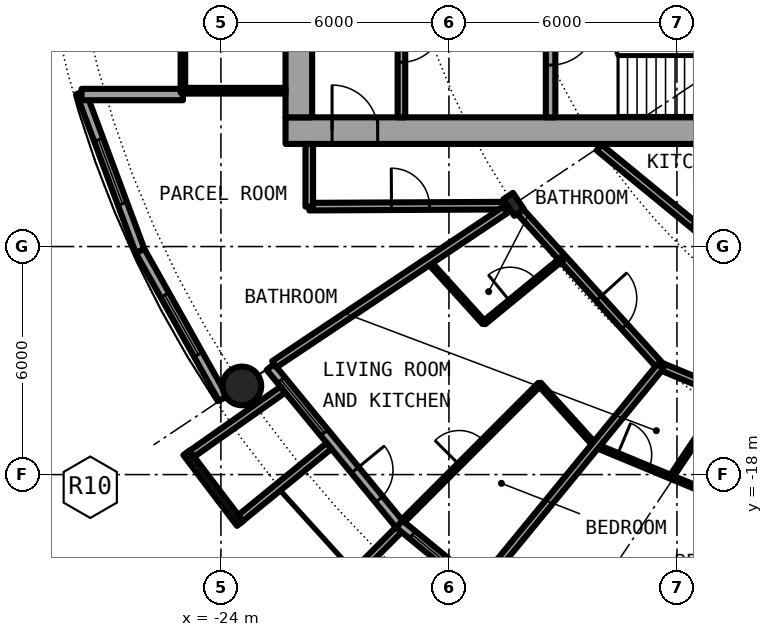
"""IFC4 building model, lengths in metres.
Left out: names, types, materials, properties, quantities, classifications, styles, units other than length and angle.
Written with IfcOpenShell. Run it as: python <this file> out.ifc"""

import sys

from ifc_helpers import new_model, si_unit, direction, frame, frame_2d, origin, origin_2d, place, context, subcontext, project, spatial, rectangle, circle, hollow_circle, i_section, extrude, element, fill, save


model = new_model("IFC4")
c1 = context("Model", 3, precision=1e-05, world=origin(), true_north=direction((0.0, 1.0)))
c2 = subcontext(c1, "Body", "Model", "MODEL_VIEW")
j1 = project(units=[si_unit("LENGTHUNIT", "METRE"), si_unit("PLANEANGLEUNIT", "RADIAN")], contexts=[c1])
p1 = place(None, origin())
s1 = spatial("IfcSite", under=j1, at=p1, CompositionType="ELEMENT")
p2 = place(p1, origin())
s2 = spatial("IfcBuilding", under=s1, at=p2, CompositionType="ELEMENT")
p3 = place(p2, frame((0.0, 0.0, 75.8)))
s3 = spatial("IfcBuildingStorey", under=s2, at=p3, CompositionType="ELEMENT", Elevation=75.8)
p4 = place(p3, frame((-23.448, -15.667, 0.0), z_axis=(0.0, 0.0, 1.0), x_axis=(1.0, 0.0, 0.0)))
e1 = element("IfcColumn", 1, at=p4, inside=s3, PredefinedType="COLUMN", context=c2, shape_type="SweptSolid", body=[
    extrude(hollow_circle(Radius=0.508, WallThickness=0.04, at=origin_2d()), origin(), (0.0, 0.0, 1.0), 3.05),
])
p5 = place(p3, frame((-16.297, -10.889, 0.0), z_axis=(0.0, 0.0, 1.0), x_axis=(-0.831469612303, -0.55557023302, 0.0)))
e2 = element("IfcColumn", 2, at=p5, inside=s3, PredefinedType="COLUMN", context=c2, shape_type="SweptSolid", body=[
    extrude(i_section(OverallWidth=0.306, OverallDepth=0.524, WebThickness=0.021, FlangeThickness=0.04, FilletRadius=0.027, at=origin_2d()), origin(), (0.0, 0.0, 1.0), 3.05),
])
p6 = place(p3, frame((-22.699, -15.167, 0.0), z_axis=(0.0, 0.0, 1.0), x_axis=(0.634382322723, -0.773019449054, 0.0)))
e3 = element("IfcWall", 3, at=p6, inside=s3, PredefinedType="SOLIDWALL", context=c2, shape_type="SweptSolid", body=[
    extrude(rectangle(XDim=5.352, YDim=0.25, at=frame_2d((2.676, 0.0))), origin(), (0.0, 0.0, 1.0), 2.7),
])
p7 = place(p6, frame((0.441, 0.0, 0.3)))
e4 = element("IfcOpeningElement", 4, at=p7, cuts=e3, PredefinedType="OPENING", context=c2, shape_type="SweptSolid", body=[
    extrude(rectangle(XDim=1.8, YDim=2.1, at=frame_2d((0.9, 1.05))), frame((0.0, 0.135, 0.0), z_axis=(0.0, -1.0, 0.0), x_axis=(1.0, 0.0, 0.0)), (0.0, 0.0, 1.0), 0.27),
])
p8 = place(p6, frame((3.51, 0.0, 0.0)))
e5 = element("IfcOpeningElement", 5, at=p8, cuts=e3, PredefinedType="OPENING", context=c2, shape_type="SweptSolid", body=[
    extrude(rectangle(XDim=1.0, YDim=2.2, at=frame_2d((0.5, 1.1))), frame((0.0, 0.135, 0.0), z_axis=(0.0, -1.0, 0.0), x_axis=(1.0, 0.0, 0.0)), (0.0, 0.0, 1.0), 0.27),
])
p9 = place(p3, frame((-24.909, -17.427, -0.03), z_axis=(0.0, 0.0, 1.0), x_axis=(0.60418752353, -0.796842165306, 0.0)))
e6 = element("IfcWall", 6, at=p9, inside=s3, PredefinedType="SOLIDWALL", context=c2, shape_type="SweptSolid", body=[
    extrude(rectangle(XDim=2.337, YDim=0.2, at=frame_2d((1.168, 0.0))), origin(), (0.0, 0.0, 1.0), 2.73),
])
p10 = place(p9, frame((0.128, 0.0, 0.33)))
e7 = element("IfcOpeningElement", 7, at=p10, cuts=e6, PredefinedType="OPENING", context=c2, shape_type="SweptSolid", body=[
    extrude(circle(Radius=1.04, at=frame_2d((1.04, 1.04))), frame((0.0, 0.11, 0.0), z_axis=(0.0, -1.0, 0.0), x_axis=(1.0, 0.0, 0.0)), (0.0, 0.0, 1.0), 0.22),
])
p11 = place(p3, frame((-22.37, -15.765, -0.03), z_axis=(0.0, 0.0, 1.0), x_axis=(-0.817256123454, -0.576274612209, 0.0)))
e8 = element("IfcWall", 8, at=p11, inside=s3, PredefinedType="SOLIDWALL", context=c2, shape_type="SweptSolid", body=[
    extrude(rectangle(XDim=2.933, YDim=0.2, at=frame_2d((1.466, 0.0))), origin(), (0.0, 0.0, 1.0), 2.73),
])
p12 = place(p3, frame((-21.155, -17.246, -0.03), z_axis=(0.0, 0.0, 1.0), x_axis=(-0.775179004516, -0.631741648902, 0.0)))
e9 = element("IfcWall", 9, at=p12, inside=s3, PredefinedType="SOLIDWALL", context=c2, shape_type="SweptSolid", body=[
    extrude(rectangle(XDim=3.006, YDim=0.2, at=frame_2d((1.503, 0.0))), origin(), (0.0, 0.0, 1.0), 2.73),
])
p13 = place(p3, frame((-19.304, -19.304, 0.0), z_axis=(0.0, 0.0, 1.0), x_axis=(0.773019449054, -0.634382322723, 0.0)))
e10 = element("IfcWall", 10, at=p13, inside=s3, PredefinedType="SOLIDWALL", context=c2, shape_type="SweptSolid", body=[
    extrude(rectangle(XDim=5.352, YDim=0.25, at=frame_2d((2.676, 0.0))), origin(), (0.0, 0.0, 1.0), 2.7),
])
p14 = place(p13, frame((0.441, 0.0, 0.3)))
e11 = element("IfcOpeningElement", 11, at=p14, cuts=e10, PredefinedType="OPENING", context=c2, shape_type="SweptSolid", body=[
    extrude(rectangle(XDim=1.8, YDim=2.1, at=frame_2d((0.9, 1.05))), frame((0.0, 0.135, 0.0), z_axis=(0.0, -1.0, 0.0), x_axis=(1.0, 0.0, 0.0)), (0.0, 0.0, 1.0), 0.27),
])
p15 = place(p13, frame((3.51, 0.0, 0.0)))
e12 = element("IfcOpeningElement", 12, at=p15, cuts=e10, PredefinedType="OPENING", context=c2, shape_type="SweptSolid", body=[
    extrude(rectangle(XDim=1.0, YDim=2.2, at=frame_2d((0.5, 1.1))), frame((0.0, 0.135, 0.0), z_axis=(0.0, -1.0, 0.0), x_axis=(1.0, 0.0, 0.0)), (0.0, 0.0, 1.0), 0.27),
])
p16 = place(p3, frame((-19.323, -19.45, -0.03), z_axis=(0.0, 0.0, 1.0), x_axis=(-0.704476739375, -0.709727076896, 0.0)))
e13 = element("IfcWall", 13, at=p16, inside=s3, PredefinedType="SOLIDWALL", context=c2, shape_type="SweptSolid", body=[
    extrude(rectangle(XDim=2.883, YDim=0.2, at=frame_2d((1.441, 0.0))), origin(), (0.0, 0.0, 1.0), 2.73),
])
p17 = place(p3, frame((-27.682, -7.945, 0.0), z_axis=(0.0, 0.0, 1.0), x_axis=(0.349247811493, -0.937030397675, 0.0)))
e14 = element("IfcWall", 14, at=p17, inside=s3, PredefinedType="SOLIDWALL", context=c2, shape_type="SweptSolid", body=[
    extrude(rectangle(XDim=4.452, YDim=0.25, at=frame_2d((2.226, 0.0))), origin(), (0.0, 0.0, 1.0), 2.7),
])
p18 = place(p17, frame((1.327, 0.0, 0.3)))
e15 = element("IfcOpeningElement", 15, at=p18, cuts=e14, PredefinedType="OPENING", context=c2, shape_type="SweptSolid", body=[
    extrude(rectangle(XDim=1.8, YDim=2.1, at=frame_2d((0.9, 1.05))), frame((0.0, 0.135, 0.0), z_axis=(0.0, -1.0, 0.0), x_axis=(1.0, 0.0, 0.0)), (0.0, 0.0, 1.0), 0.27),
])
p19 = place(p3, frame((-26.127, -12.117, 0.0), z_axis=(0.0, 0.0, 1.0), x_axis=(0.489696356642, -0.871893042919, 0.0)))
e16 = element("IfcWall", 16, at=p19, inside=s3, PredefinedType="SOLIDWALL", context=c2, shape_type="SweptSolid", body=[
    extrude(rectangle(XDim=4.454, YDim=0.25, at=frame_2d((2.227, 0.0))), origin(), (0.0, 0.0, 1.0), 2.7),
])
p20 = place(p19, frame((1.327, 0.0, 0.3)))
e17 = element("IfcOpeningElement", 17, at=p20, cuts=e16, PredefinedType="OPENING", context=c2, shape_type="SweptSolid", body=[
    extrude(rectangle(XDim=1.8, YDim=2.1, at=frame_2d((0.9, 1.05))), frame((0.0, 0.135, 0.0), z_axis=(0.0, -1.0, 0.0), x_axis=(1.0, 0.0, 0.0)), (0.0, 0.0, 1.0), 0.27),
])
p21 = place(p3, frame((-25.0, -8.0, 0.0), z_axis=(0.0, 0.0, 1.0), x_axis=(-1.0, 0.0, 0.0)))
e18 = element("IfcWall", 18, at=p21, inside=s3, PredefinedType="SOLIDWALL", context=c2, shape_type="SweptSolid", body=[
    extrude(rectangle(XDim=2.667, YDim=0.3, at=frame_2d((1.333, 0.0))), origin(), (0.0, 0.0, 1.0), 2.7),
])
p22 = place(p3, frame((-22.3, -8.95, 0.0), z_axis=(0.0, 0.0, 1.0), x_axis=(1.0, 0.0, 0.0)))
e19 = element("IfcWall", 19, at=p22, inside=s3, PredefinedType="SHEAR", context=c2, shape_type="SweptSolid", body=[
    extrude(rectangle(XDim=14.0, YDim=0.7, at=frame_2d((7.0, 0.0))), origin(), (0.0, 0.0, 1.0), 3.05),
])
p23 = place(p22, frame((1.225, 0.0, 0.0)))
e20 = element("IfcOpeningElement", 20, at=p23, cuts=e19, PredefinedType="OPENING", context=c2, shape_type="SweptSolid", body=[
    extrude(rectangle(XDim=1.2, YDim=2.3, at=frame_2d((0.6, 1.15))), frame((0.0, 0.36, 0.0), z_axis=(0.0, -1.0, 0.0), x_axis=(1.0, 0.0, 0.0)), (0.0, 0.0, 1.0), 0.72),
])
p24 = place(p3, frame((-21.95, -8.6, 0.0), z_axis=(0.0, 0.0, 1.0), x_axis=(0.0, 1.0, 0.0)))
e21 = element("IfcWall", 21, at=p24, inside=s3, PredefinedType="SHEAR", context=c2, shape_type="SweptSolid", body=[
    extrude(rectangle(XDim=17.2, YDim=0.7, at=frame_2d((8.6, 0.0))), origin(), (0.0, 0.0, 1.0), 3.05),
])
p25 = place(p24, frame((7.7, 0.0, 0.0)))
e22 = element("IfcOpeningElement", 22, at=p25, cuts=e21, PredefinedType="OPENING", context=c2, shape_type="SweptSolid", body=[
    extrude(rectangle(XDim=1.8, YDim=2.3, at=frame_2d((0.9, 1.15))), frame((0.0, 0.36, 0.0), z_axis=(0.0, -1.0, 0.0), x_axis=(1.0, 0.0, 0.0)), (0.0, 0.0, 1.0), 0.72),
])
p26 = place(p3, frame((-15.325, -4.65, 0.0), z_axis=(0.0, 0.0, 1.0), x_axis=(0.0, -1.0, 0.0)))
e23 = element("IfcWall", 23, at=p26, inside=s3, PredefinedType="SHEAR", context=c2, shape_type="SweptSolid", body=[
    extrude(rectangle(XDim=3.95, YDim=0.25, at=frame_2d((1.975, 0.0))), origin(), (0.0, 0.0, 1.0), 3.05),
])
p27 = place(p26, frame((1.375, 0.0, 0.0)))
e24 = element("IfcOpeningElement", 24, at=p27, cuts=e23, PredefinedType="OPENING", context=c2, shape_type="SweptSolid", body=[
    extrude(rectangle(XDim=1.2, YDim=2.3, at=frame_2d((0.6, 1.15))), frame((0.0, 0.135, 0.0), z_axis=(0.0, -1.0, 0.0), x_axis=(1.0, 0.0, 0.0)), (0.0, 0.0, 1.0), 0.27),
])
p28 = place(p3, frame((-19.25, -1.575, 0.0), z_axis=(0.0, 0.0, 1.0), x_axis=(0.0, -1.0, 0.0)))
e25 = element("IfcWall", 25, at=p28, inside=s3, PredefinedType="SOLIDWALL", context=c2, shape_type="SweptSolid", body=[
    extrude(rectangle(XDim=7.025, YDim=0.2, at=frame_2d((3.513, 0.0))), origin(), (0.0, 0.0, 1.0), 2.7),
])
p29 = place(p28, frame((4.475, 0.0, 0.0)))
e26 = element("IfcOpeningElement", 26, at=p29, cuts=e25, PredefinedType="OPENING", context=c2, shape_type="SweptSolid", body=[
    extrude(rectangle(XDim=1.1, YDim=2.3, at=frame_2d((0.55, 1.15))), frame((0.0, 0.11, 0.0), z_axis=(0.0, -1.0, 0.0), x_axis=(1.0, 0.0, 0.0)), (0.0, 0.0, 1.0), 0.22),
])
p30 = place(p3, frame((-22.3, -7.9, 0.0), z_axis=(0.0, 0.0, 1.0), x_axis=(-1.0, 0.0, 0.0)))
e27 = element("IfcWall", 27, at=p30, inside=s3, PredefinedType="PARTITIONING", context=c2, shape_type="SweptSolid", body=[
    extrude(rectangle(XDim=2.64, YDim=0.15, at=frame_2d((1.32, 0.0))), origin(), (0.0, 0.0, 1.0), 2.7),
])
p31 = place(p3, frame((-25.0, 7.95, 0.0), z_axis=(0.0, 0.0, 1.0), x_axis=(0.0, -1.0, 0.0)))
e28 = element("IfcWall", 28, at=p31, inside=s3, PredefinedType="PARTITIONING", context=c2, shape_type="SweptSolid", body=[
    extrude(rectangle(XDim=15.9, YDim=0.12, at=frame_2d((7.95, 0.0))), origin(), (0.0, 0.0, 1.0), 2.7),
])
p32 = place(p31, frame((0.95, 0.0, 0.1)))
e29 = element("IfcOpeningElement", 29, at=p32, cuts=e28, PredefinedType="OPENING", context=c2, shape_type="SweptSolid", body=[
    extrude(rectangle(XDim=14.0, YDim=2.35, at=frame_2d((7.0, 1.175))), frame((0.0, 0.07, 0.0), z_axis=(0.0, -1.0, 0.0), x_axis=(1.0, 0.0, 0.0)), (0.0, 0.0, 1.0), 0.14),
])
p33 = place(p3, frame((-18.542, -12.389, 0.0), z_axis=(0.0, 0.0, 1.0), x_axis=(0.671396556615, -0.741098282123, 0.0)))
e30 = element("IfcWall", 30, at=p33, inside=s3, PredefinedType="PARTITIONING", context=c2, shape_type="SweptSolid", body=[
    extrude(rectangle(XDim=2.182, YDim=0.1, at=frame_2d((1.091, 0.0))), origin(), (0.0, 0.0, 1.0), 2.7),
])
p34 = place(p3, frame((-15.617, -15.617, 0.0), z_axis=(0.0, 0.0, 1.0), x_axis=(0.671144831591, -0.741326254107, 0.0)))
e31 = element("IfcWall", 31, at=p34, inside=s3, PredefinedType="PARTITIONING", context=c2, shape_type="SweptSolid", body=[
    extrude(rectangle(XDim=2.181, YDim=0.1, at=frame_2d((1.091, 0.0))), origin(), (0.0, 0.0, 1.0), 2.7),
])
p35 = place(p3, frame((-14.15, -17.236, 0.0), z_axis=(0.0, 0.0, 1.0), x_axis=(0.923789421174, -0.382900907975, 0.0)))
e32 = element("IfcWall", 32, at=p35, inside=s3, PredefinedType="PARTITIONING", context=c2, shape_type="SweptSolid", body=[
    extrude(rectangle(XDim=4.319, YDim=0.1, at=frame_2d((2.16, 0.0))), origin(), (0.0, 0.0, 1.0), 2.7),
])
p36 = place(p35, frame((0.634, 0.0, 0.0)))
e33 = element("IfcOpeningElement", 33, at=p36, cuts=e32, PredefinedType="OPENING", context=c2, shape_type="SweptSolid", body=[
    extrude(rectangle(XDim=0.9, YDim=2.3, at=frame_2d((0.45, 1.15))), frame((0.0, 0.06, 0.0), z_axis=(0.0, -1.0, 0.0), x_axis=(1.0, 0.0, 0.0)), (0.0, 0.0, 1.0), 0.12),
])
p37 = place(p3, frame((-16.193, -11.004, 0.0), z_axis=(0.0, 0.0, 1.0), x_axis=(0.671601747072, -0.740912338492, 0.0)))
e34 = element("IfcWall", 34, at=p37, inside=s3, PredefinedType="PARTITIONING", context=c2, shape_type="SweptSolid", body=[
    extrude(rectangle(XDim=5.597, YDim=0.2, at=frame_2d((2.799, 0.0))), origin(), (0.0, 0.0, 1.0), 2.38),
])
p38 = place(p37, frame((3.18, 0.0, 0.0)))
e35 = element("IfcOpeningElement", 35, at=p38, cuts=e34, PredefinedType="OPENING", context=c2, shape_type="SweptSolid", body=[
    extrude(rectangle(XDim=1.0, YDim=2.3, at=frame_2d((0.5, 1.15))), frame((0.0, 0.11, 0.0), z_axis=(0.0, -1.0, 0.0), x_axis=(1.0, 0.0, 0.0)), (0.0, 0.0, 1.0), 0.22),
])
p39 = place(p3, frame((-12.436, -15.15, 0.0), z_axis=(0.0, 0.0, 1.0), x_axis=(0.923858130651, -0.38273509694, 0.0)))
e36 = element("IfcWall", 36, at=p39, inside=s3, PredefinedType="PARTITIONING", context=c2, shape_type="SweptSolid", body=[
    extrude(rectangle(XDim=11.382, YDim=0.2, at=frame_2d((5.691, 0.0))), origin(), (0.0, 0.0, 1.0), 2.7),
])
p40 = place(p39, frame((4.239, 0.0, 0.0)))
e37 = element("IfcOpeningElement", 37, at=p40, cuts=e36, PredefinedType="OPENING", context=c2, shape_type="SweptSolid", body=[
    extrude(rectangle(XDim=1.0, YDim=2.3, at=frame_2d((0.5, 1.15))), frame((0.0, 0.11, 0.0), z_axis=(0.0, -1.0, 0.0), x_axis=(1.0, 0.0, 0.0)), (0.0, 0.0, 1.0), 0.22),
])
p41 = place(p3, frame((-14.05, -9.392, 0.0), z_axis=(0.0, 0.0, 1.0), x_axis=(0.773074935257, -0.634314704605, 0.0)))
e38 = element("IfcWall", 38, at=p41, inside=s3, PredefinedType="PARTITIONING", context=c2, shape_type="SweptSolid", body=[
    extrude(rectangle(XDim=9.809, YDim=0.2, at=frame_2d((4.904, 0.0))), origin(), (0.0, 0.0, 1.0), 2.7),
])
p42 = place(p41, frame((4.402, 0.0, 0.0)))
e39 = element("IfcOpeningElement", 39, at=p42, cuts=e38, PredefinedType="OPENING", context=c2, shape_type="SweptSolid", body=[
    extrude(rectangle(XDim=1.0, YDim=2.3, at=frame_2d((0.5, 1.15))), frame((0.0, 0.11, 0.0), z_axis=(0.0, -1.0, 0.0), x_axis=(1.0, 0.0, 0.0)), (0.0, 0.0, 1.0), 0.22),
])
p43 = place(p3, frame((-21.675, -10.95, 0.0), z_axis=(0.0, 0.0, 1.0), x_axis=(0.999987054722, 0.005088259783, 0.0)))
e40 = element("IfcWall", 40, at=p43, inside=s3, PredefinedType="PARTITIONING", context=c2, shape_type="SweptSolid", body=[
    extrude(rectangle(XDim=5.086, YDim=0.2, at=frame_2d((2.543, 0.0))), origin(), (0.0, 0.0, 1.0), 2.7),
])
p44 = place(p43, frame((2.163, 0.0, 0.0)))
e41 = element("IfcOpeningElement", 41, at=p44, cuts=e40, PredefinedType="OPENING", context=c2, shape_type="SweptSolid", body=[
    extrude(rectangle(XDim=1.0, YDim=2.3, at=frame_2d((0.5, 1.15))), frame((0.0, 0.11, 0.0), z_axis=(0.0, -1.0, 0.0), x_axis=(1.0, 0.0, 0.0)), (0.0, 0.0, 1.0), 0.22),
])
p45 = place(p3, frame((-22.595, -15.097, 0.0), z_axis=(0.0, 0.0, 1.0), x_axis=(0.831505405283, 0.555516661303, 0.0)))
e42 = element("IfcWall", 42, at=p45, inside=s3, PredefinedType="PARTITIONING", context=c2, shape_type="SweptSolid", body=[
    extrude(rectangle(XDim=7.312, YDim=0.2, at=frame_2d((3.656, 0.0))), origin(), (0.0, 0.0, 1.0), 2.7),
])
p46 = place(p3, frame((-19.21, -19.222, 0.0), z_axis=(0.0, 0.0, 1.0), x_axis=(0.706914880313, 0.707298629994, 0.0)))
e43 = element("IfcWall", 43, at=p46, inside=s3, PredefinedType="PARTITIONING", context=c2, shape_type="SweptSolid", body=[
    extrude(rectangle(XDim=5.09, YDim=0.1, at=frame_2d((2.545, 0.0))), origin(), (0.0, 0.0, 1.0), 2.7),
])
p47 = place(p46, frame((2.095, 0.0, 0.0)))
e44 = element("IfcOpeningElement", 44, at=p47, cuts=e43, PredefinedType="OPENING", context=c2, shape_type="SweptSolid", body=[
    extrude(rectangle(XDim=0.9, YDim=2.3, at=frame_2d((0.45, 1.15))), frame((0.0, 0.06, 0.0), z_axis=(0.0, -1.0, 0.0), x_axis=(1.0, 0.0, 0.0)), (0.0, 0.0, 1.0), 0.12),
])
p48 = place(p3, frame((-17.239, -21.008, 0.0), z_axis=(0.0, 0.0, 1.0), x_axis=(0.634318093068, 0.773072154981, 0.0)))
e45 = element("IfcWall", 45, at=p48, inside=s3, PredefinedType="PARTITIONING", context=c2, shape_type="SweptSolid", body=[
    extrude(rectangle(XDim=7.576, YDim=0.2, at=frame_2d((3.788, 0.0))), origin(), (0.0, 0.0, 1.0), 2.7),
])
p49 = place(p3, frame((-17.077, -14.006, 0.0), z_axis=(0.0, 0.0, 1.0), x_axis=(0.77319617123, 0.634166918717, 0.0)))
e46 = element("IfcWall", 46, at=p49, inside=s3, PredefinedType="PARTITIONING", context=c2, shape_type="SweptSolid", body=[
    extrude(rectangle(XDim=2.675, YDim=0.1, at=frame_2d((1.337, 0.0))), origin(), (0.0, 0.0, 1.0), 2.7),
])
p50 = place(p49, frame((0.887, 0.0, 0.0)))
e47 = element("IfcOpeningElement", 47, at=p50, cuts=e46, PredefinedType="OPENING", context=c2, shape_type="SweptSolid", body=[
    extrude(rectangle(XDim=0.9, YDim=2.3, at=frame_2d((0.45, 1.15))), frame((0.0, 0.06, 0.0), z_axis=(0.0, -1.0, 0.0), x_axis=(1.0, 0.0, 0.0)), (0.0, 0.0, 1.0), 0.12),
])
p51 = place(p3, frame((-12.153, -18.064, 0.0), z_axis=(0.0, 0.0, 1.0), x_axis=(0.558383137663, 0.829583191472, 0.0)))
e48 = element("IfcWall", 48, at=p51, inside=s3, PredefinedType="PARTITIONING", context=c2, shape_type="SweptSolid", body=[
    extrude(rectangle(XDim=1.909, YDim=0.1, at=frame_2d((0.955, 0.0))), origin(), (0.0, 0.0, 1.0), 2.7),
])
p52 = place(p3, frame((-21.675, -10.95, 0.0), z_axis=(0.0, 0.0, 1.0), x_axis=(0.0, 1.0, 0.0)))
e49 = element("IfcWall", 49, at=p52, inside=s3, PredefinedType="PARTITIONING", context=c2, shape_type="SweptSolid", body=[
    extrude(rectangle(XDim=1.65, YDim=0.2, at=frame_2d((0.825, 0.0))), origin(), (0.0, 0.0, 1.0), 2.7),
])
p53 = place(p7, origin())
e50 = element("IfcWindow", 50, at=p53, inside=s3, PartitioningType="SINGLE_PANEL", PredefinedType="WINDOW", context=c2, shape_type="SweptSolid", body=[
    extrude(rectangle(XDim=1.8, YDim=2.1, at=frame_2d((0.9, 1.05))), frame((0.0, 0.03, 0.0), z_axis=(0.0, -1.0, 0.0), x_axis=(1.0, 0.0, 0.0)), (0.0, 0.0, 1.0), 0.06),
])
fill(e4, e50)
p54 = place(p10, origin())
e51 = element("IfcWindow", 51, at=p54, inside=s3, PartitioningType="SINGLE_PANEL", PredefinedType="WINDOW", context=c2, shape_type="SweptSolid", body=[
    extrude(circle(Radius=1.04, at=frame_2d((1.04, 1.04))), frame((0.0, 0.03, 0.0), z_axis=(0.0, -1.0, 0.0), x_axis=(1.0, 0.0, 0.0)), (0.0, 0.0, 1.0), 0.06),
])
fill(e7, e51)
p55 = place(p8, origin())
e52 = element("IfcDoor", 52, at=p55, inside=s3, OperationType="SINGLE_SWING_LEFT", PredefinedType="DOOR", context=c2, shape_type="SweptSolid", body=[
    extrude(rectangle(XDim=1.0, YDim=2.2, at=frame_2d((0.5, 1.1))), frame((0.0, 0.025, 0.0), z_axis=(0.0, -1.0, 0.0), x_axis=(1.0, 0.0, 0.0)), (0.0, 0.0, 1.0), 0.05),
])
fill(e5, e52)
p56 = place(p14, origin())
e53 = element("IfcWindow", 53, at=p56, inside=s3, PartitioningType="SINGLE_PANEL", PredefinedType="WINDOW", context=c2, shape_type="SweptSolid", body=[
    extrude(rectangle(XDim=1.8, YDim=2.1, at=frame_2d((0.9, 1.05))), frame((0.0, 0.03, 0.0), z_axis=(0.0, -1.0, 0.0), x_axis=(1.0, 0.0, 0.0)), (0.0, 0.0, 1.0), 0.06),
])
fill(e11, e53)
p57 = place(p18, origin())
e54 = element("IfcWindow", 54, at=p57, inside=s3, PartitioningType="SINGLE_PANEL", PredefinedType="WINDOW", context=c2, shape_type="SweptSolid", body=[
    extrude(rectangle(XDim=1.8, YDim=2.1, at=frame_2d((0.9, 1.05))), frame((0.0, 0.03, 0.0), z_axis=(0.0, -1.0, 0.0), x_axis=(1.0, 0.0, 0.0)), (0.0, 0.0, 1.0), 0.06),
])
fill(e15, e54)
p58 = place(p20, origin())
e55 = element("IfcWindow", 55, at=p58, inside=s3, PartitioningType="SINGLE_PANEL", PredefinedType="WINDOW", context=c2, shape_type="SweptSolid", body=[
    extrude(rectangle(XDim=1.8, YDim=2.1, at=frame_2d((0.9, 1.05))), frame((0.0, 0.03, 0.0), z_axis=(0.0, -1.0, 0.0), x_axis=(1.0, 0.0, 0.0)), (0.0, 0.0, 1.0), 0.06),
])
fill(e17, e55)
p59 = place(p27, origin())
e56 = element("IfcDoor", 56, at=p59, inside=s3, OperationType="SINGLE_SWING_LEFT", PredefinedType="DOOR", context=c2, shape_type="SweptSolid", body=[
    extrude(rectangle(XDim=1.2, YDim=2.3, at=frame_2d((0.6, 1.15))), frame((0.0, 0.025, 0.0), z_axis=(0.0, -1.0, 0.0), x_axis=(1.0, 0.0, 0.0)), (0.0, 0.0, 1.0), 0.05),
])
fill(e24, e56)
p60 = place(p29, origin())
e57 = element("IfcDoor", 57, at=p60, inside=s3, OperationType="SINGLE_SWING_LEFT", PredefinedType="DOOR", context=c2, shape_type="SweptSolid", body=[
    extrude(rectangle(XDim=1.1, YDim=2.3, at=frame_2d((0.55, 1.15))), frame((0.0, 0.025, 0.0), z_axis=(0.0, -1.0, 0.0), x_axis=(1.0, 0.0, 0.0)), (0.0, 0.0, 1.0), 0.05),
])
fill(e26, e57)
p61 = place(p23, origin())
e58 = element("IfcDoor", 58, at=p61, inside=s3, OperationType="SINGLE_SWING_RIGHT", PredefinedType="DOOR", context=c2, shape_type="SweptSolid", body=[
    extrude(rectangle(XDim=1.2, YDim=2.3, at=frame_2d((0.6, 1.15))), frame((0.0, 0.025, 0.0), z_axis=(0.0, -1.0, 0.0), x_axis=(1.0, 0.0, 0.0)), (0.0, 0.0, 1.0), 0.05),
])
fill(e20, e58)
p62 = place(p32, origin())
e59 = element("IfcWindow", 59, at=p62, inside=s3, PartitioningType="SINGLE_PANEL", PredefinedType="WINDOW", context=c2, shape_type="SweptSolid", body=[
    extrude(rectangle(XDim=14.0, YDim=2.35, at=frame_2d((7.0, 1.175))), frame((0.0, 0.03, 0.0), z_axis=(0.0, -1.0, 0.0), x_axis=(1.0, 0.0, 0.0)), (0.0, 0.0, 1.0), 0.06),
])
fill(e29, e59)
p63 = place(p38, origin())
e60 = element("IfcDoor", 60, at=p63, inside=s3, OperationType="SINGLE_SWING_RIGHT", PredefinedType="DOOR", context=c2, shape_type="SweptSolid", body=[
    extrude(rectangle(XDim=1.0, YDim=2.3, at=frame_2d((0.5, 1.15))), frame((0.0, 0.025, 0.0), z_axis=(0.0, -1.0, 0.0), x_axis=(1.0, 0.0, 0.0)), (0.0, 0.0, 1.0), 0.05),
])
fill(e35, e60)
p64 = place(p50, origin())
e61 = element("IfcDoor", 61, at=p64, inside=s3, OperationType="SINGLE_SWING_LEFT", PredefinedType="DOOR", context=c2, shape_type="SweptSolid", body=[
    extrude(rectangle(XDim=0.9, YDim=2.3, at=frame_2d((0.45, 1.15))), frame((0.0, 0.025, 0.0), z_axis=(0.0, -1.0, 0.0), x_axis=(1.0, 0.0, 0.0)), (0.0, 0.0, 1.0), 0.05),
])
fill(e47, e61)
p65 = place(p47, origin())
e62 = element("IfcDoor", 62, at=p65, inside=s3, OperationType="SINGLE_SWING_RIGHT", PredefinedType="DOOR", context=c2, shape_type="SweptSolid", body=[
    extrude(rectangle(XDim=0.9, YDim=2.3, at=frame_2d((0.45, 1.15))), frame((0.0, 0.025, 0.0), z_axis=(0.0, -1.0, 0.0), x_axis=(1.0, 0.0, 0.0)), (0.0, 0.0, 1.0), 0.05),
])
fill(e44, e62)
p66 = place(p36, origin())
e63 = element("IfcDoor", 63, at=p66, inside=s3, OperationType="SINGLE_SWING_LEFT", PredefinedType="DOOR", context=c2, shape_type="SweptSolid", body=[
    extrude(rectangle(XDim=0.9, YDim=2.3, at=frame_2d((0.45, 1.15))), frame((0.0, 0.025, 0.0), z_axis=(0.0, -1.0, 0.0), x_axis=(1.0, 0.0, 0.0)), (0.0, 0.0, 1.0), 0.05),
])
fill(e33, e63)
p67 = place(p44, origin())
e64 = element("IfcDoor", 64, at=p67, inside=s3, OperationType="SINGLE_SWING_RIGHT", PredefinedType="DOOR", context=c2, shape_type="SweptSolid", body=[
    extrude(rectangle(XDim=1.0, YDim=2.3, at=frame_2d((0.5, 1.15))), frame((0.0, 0.025, 0.0), z_axis=(0.0, -1.0, 0.0), x_axis=(1.0, 0.0, 0.0)), (0.0, 0.0, 1.0), 0.05),
])
fill(e41, e64)
save(model, sys.argv[1])
